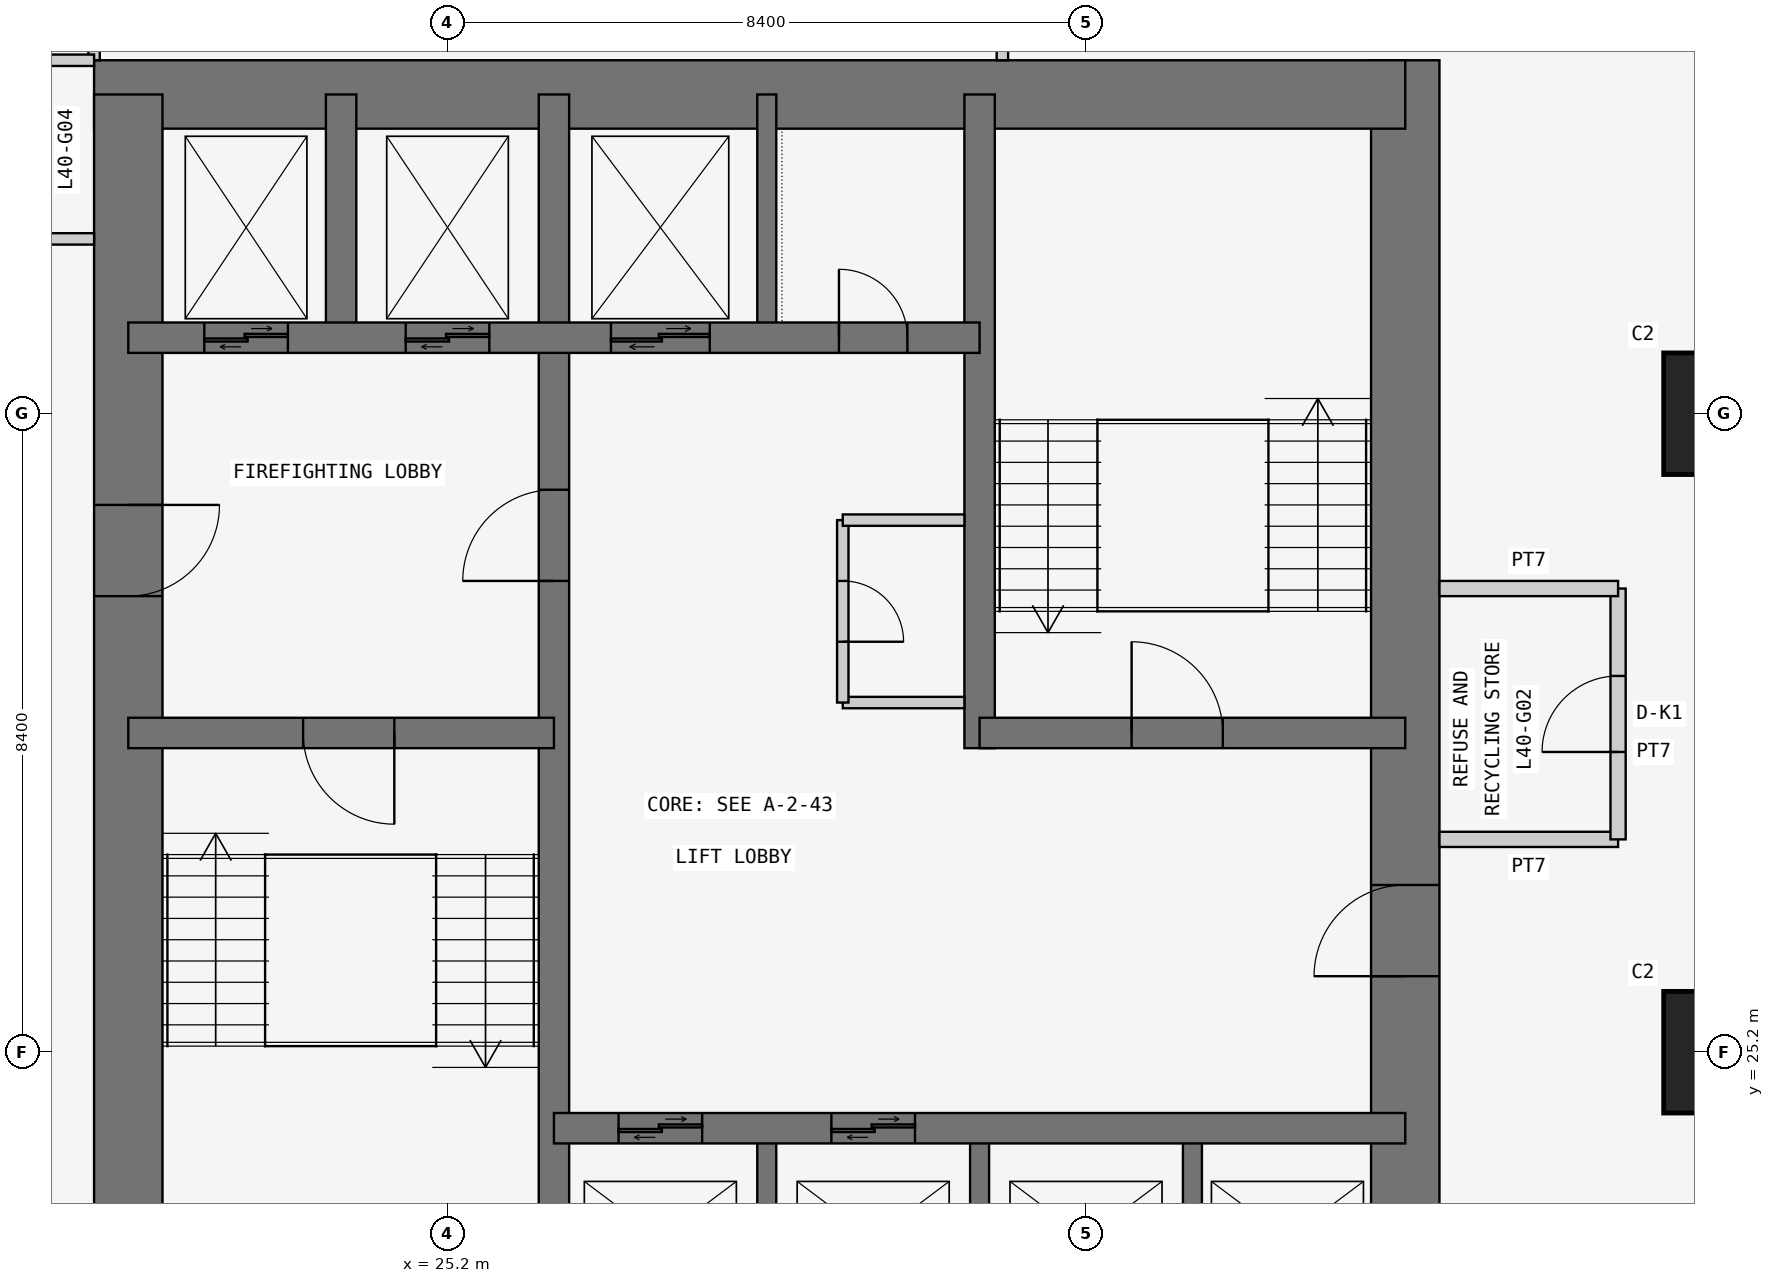
"""IFC4 building model, lengths in metres.
Left out: names, types, materials, properties, quantities, classifications, styles, units other than length and angle.
Written with IfcOpenShell. Run it as: python <this file> out.ifc"""

import sys

from ifc_helpers import new_model, si_unit, direction, frame, frame_2d, origin, origin_2d, place, context, subcontext, project, spatial, rectangle, extrude, element, fill, save


model = new_model("IFC4")
c1 = context("Model", 3, precision=1e-05, world=origin(), true_north=direction((0.0, 1.0)))
c2 = subcontext(c1, "Body", "Model", "MODEL_VIEW")
j1 = project(units=[si_unit("LENGTHUNIT", "METRE"), si_unit("PLANEANGLEUNIT", "RADIAN")], contexts=[c1])
p1 = place(None, origin())
s1 = spatial("IfcSite", under=j1, at=p1, CompositionType="ELEMENT")
p2 = place(p1, origin())
s2 = spatial("IfcBuilding", under=s1, at=p2, CompositionType="ELEMENT")
p3 = place(p2, frame((0.0, 0.0, 155.7)))
s3 = spatial("IfcBuildingStorey", under=s2, at=p3, CompositionType="ELEMENT", Elevation=155.7)
for number, where, z_axis, x_axis in (
    (1, (42.0, 25.2, 0.0), (0.0, 0.0, 1.0), (1.0, 0.0, 0.0)),
    (2, (42.0, 33.6, 0.0), (0.0, 0.0, 1.0), (1.0, 0.0, 0.0)),
):
    element("IfcColumn", number, at=place(p3, frame(where, z_axis=z_axis, x_axis=x_axis)), inside=s3, PredefinedType="COLUMN", context=c2, shape_type="SweptSolid", body=[
        extrude(rectangle(XDim=1.6, YDim=1.6, at=origin_2d()), origin(), (0.0, 0.0, 1.0), 3.6),
    ])
p4 = place(p3, frame((37.8, 21.0, 0.0), z_axis=(0.0, 0.0, 1.0), x_axis=(0.0, 1.0, 0.0)))
e3 = element("IfcWall", 3, at=p4, inside=s3, PredefinedType="SHEAR", context=c2, shape_type="SweptSolid", body=[
    extrude(rectangle(XDim=17.25, YDim=0.9, at=frame_2d((8.625, 0.0))), origin(), (0.0, 0.0, 1.0), 3.6),
])
p5 = place(p4, frame((5.2, 0.0, 0.0)))
e4 = element("IfcOpeningElement", 4, at=p5, cuts=e3, PredefinedType="OPENING", context=c2, shape_type="SweptSolid", body=[
    extrude(rectangle(XDim=1.2, YDim=2.1, at=frame_2d((0.6, 1.05))), frame((0.0, 0.46, 0.0), z_axis=(0.0, -1.0, 0.0), x_axis=(1.0, 0.0, 0.0)), (0.0, 0.0, 1.0), 0.92),
])
p6 = place(p3, frame((37.8, 37.8, 0.0), z_axis=(0.0, 0.0, 1.0), x_axis=(-1.0, 0.0, 0.0)))
e5 = element("IfcWall", 5, at=p6, inside=s3, PredefinedType="SHEAR", context=c2, shape_type="SweptSolid", body=[
    extrude(rectangle(XDim=17.25, YDim=0.9, at=frame_2d((8.625, 0.0))), origin(), (0.0, 0.0, 1.0), 3.6),
])
p7 = place(p3, frame((21.0, 37.8, 0.0), z_axis=(0.0, 0.0, 1.0), x_axis=(0.0, -1.0, 0.0)))
e6 = element("IfcWall", 6, at=p7, inside=s3, PredefinedType="SHEAR", context=c2, shape_type="SweptSolid", body=[
    extrude(rectangle(XDim=17.25, YDim=0.9, at=frame_2d((8.625, 0.0))), origin(), (0.0, 0.0, 1.0), 3.6),
])
p8 = place(p7, frame((5.4, 0.0, 0.0)))
e7 = element("IfcOpeningElement", 7, at=p8, cuts=e6, PredefinedType="OPENING", context=c2, shape_type="SweptSolid", body=[
    extrude(rectangle(XDim=1.2, YDim=2.1, at=frame_2d((0.6, 1.05))), frame((0.0, 0.46, 0.0), z_axis=(0.0, -1.0, 0.0), x_axis=(1.0, 0.0, 0.0)), (0.0, 0.0, 1.0), 0.92),
])
p9 = place(p3, frame((26.6, 21.0, 0.0), z_axis=(0.0, 0.0, 1.0), x_axis=(0.0, 1.0, 0.0)))
e8 = element("IfcWall", 8, at=p9, inside=s3, PredefinedType="SHEAR", context=c2, shape_type="SweptSolid", body=[
    extrude(rectangle(XDim=16.8, YDim=0.4, at=frame_2d((8.4, 0.0))), origin(), (0.0, 0.0, 1.0), 3.6),
])
p10 = place(p9, frame((10.4, 0.0, 0.0)))
e9 = element("IfcOpeningElement", 9, at=p10, cuts=e8, PredefinedType="OPENING", context=c2, shape_type="SweptSolid", body=[
    extrude(rectangle(XDim=1.2, YDim=2.1, at=frame_2d((0.6, 1.05))), frame((0.0, 0.21, 0.0), z_axis=(0.0, -1.0, 0.0), x_axis=(1.0, 0.0, 0.0)), (0.0, 0.0, 1.0), 0.42),
])
p11 = place(p3, frame((21.0, 29.4, 0.0), z_axis=(0.0, 0.0, 1.0), x_axis=(1.0, 0.0, 0.0)))
e10 = element("IfcWall", 10, at=p11, inside=s3, PredefinedType="SHEAR", context=c2, shape_type="SweptSolid", body=[
    extrude(rectangle(XDim=5.6, YDim=0.4, at=frame_2d((2.8, 0.0))), origin(), (0.0, 0.0, 1.0), 3.6),
])
p12 = place(p11, frame((2.3, 0.0, 0.0)))
e11 = element("IfcOpeningElement", 11, at=p12, cuts=e10, PredefinedType="OPENING", context=c2, shape_type="SweptSolid", body=[
    extrude(rectangle(XDim=1.2, YDim=2.1, at=frame_2d((0.6, 1.05))), frame((0.0, 0.21, 0.0), z_axis=(0.0, -1.0, 0.0), x_axis=(1.0, 0.0, 0.0)), (0.0, 0.0, 1.0), 0.42),
])
p13 = place(p3, frame((21.0, 34.6, 0.0), z_axis=(0.0, 0.0, 1.0), x_axis=(1.0, 0.0, 0.0)))
e12 = element("IfcWall", 12, at=p13, inside=s3, PredefinedType="SHEAR", context=c2, shape_type="SweptSolid", body=[
    extrude(rectangle(XDim=11.2, YDim=0.4, at=frame_2d((5.6, 0.0))), origin(), (0.0, 0.0, 1.0), 3.6),
])
p14 = place(p13, frame((9.35, 0.0, 0.0)))
e13 = element("IfcOpeningElement", 13, at=p14, cuts=e12, PredefinedType="OPENING", context=c2, shape_type="SweptSolid", body=[
    extrude(rectangle(XDim=0.9, YDim=2.1, at=frame_2d((0.45, 1.05))), frame((0.0, 0.21, 0.0), z_axis=(0.0, -1.0, 0.0), x_axis=(1.0, 0.0, 0.0)), (0.0, 0.0, 1.0), 0.42),
])
p15 = place(p13, frame((1.0, 0.0, 0.0)))
e14 = element("IfcOpeningElement", 14, at=p15, cuts=e12, PredefinedType="OPENING", context=c2, shape_type="SweptSolid", body=[
    extrude(rectangle(XDim=1.1, YDim=2.1, at=frame_2d((0.55, 1.05))), frame((0.0, 0.21, 0.0), z_axis=(0.0, -1.0, 0.0), x_axis=(1.0, 0.0, 0.0)), (0.0, 0.0, 1.0), 0.42),
])
p16 = place(p13, frame((3.65, 0.0, 0.0)))
e15 = element("IfcOpeningElement", 15, at=p16, cuts=e12, PredefinedType="OPENING", context=c2, shape_type="SweptSolid", body=[
    extrude(rectangle(XDim=1.1, YDim=2.1, at=frame_2d((0.55, 1.05))), frame((0.0, 0.21, 0.0), z_axis=(0.0, -1.0, 0.0), x_axis=(1.0, 0.0, 0.0)), (0.0, 0.0, 1.0), 0.42),
])
p17 = place(p13, frame((6.35, 0.0, 0.0)))
e16 = element("IfcOpeningElement", 16, at=p17, cuts=e12, PredefinedType="OPENING", context=c2, shape_type="SweptSolid", body=[
    extrude(rectangle(XDim=1.3, YDim=2.1, at=frame_2d((0.65, 1.05))), frame((0.0, 0.21, 0.0), z_axis=(0.0, -1.0, 0.0), x_axis=(1.0, 0.0, 0.0)), (0.0, 0.0, 1.0), 0.42),
])
p18 = place(p3, frame((23.8, 34.6, 0.0), z_axis=(0.0, 0.0, 1.0), x_axis=(0.0, 1.0, 0.0)))
e17 = element("IfcWall", 17, at=p18, inside=s3, PredefinedType="SHEAR", context=c2, shape_type="SweptSolid", body=[
    extrude(rectangle(XDim=3.2, YDim=0.4, at=frame_2d((1.6, 0.0))), origin(), (0.0, 0.0, 1.0), 3.6),
])
p19 = place(p3, frame((26.6, 24.2, 0.0), z_axis=(0.0, 0.0, 1.0), x_axis=(1.0, 0.0, 0.0)))
e18 = element("IfcWall", 18, at=p19, inside=s3, PredefinedType="SHEAR", context=c2, shape_type="SweptSolid", body=[
    extrude(rectangle(XDim=11.2, YDim=0.4, at=frame_2d((5.6, 0.0))), origin(), (0.0, 0.0, 1.0), 3.6),
])
p20 = place(p19, frame((0.85, 0.0, 0.0)))
e19 = element("IfcOpeningElement", 19, at=p20, cuts=e18, PredefinedType="OPENING", context=c2, shape_type="SweptSolid", body=[
    extrude(rectangle(XDim=1.1, YDim=2.1, at=frame_2d((0.55, 1.05))), frame((0.0, 0.21, 0.0), z_axis=(0.0, -1.0, 0.0), x_axis=(1.0, 0.0, 0.0)), (0.0, 0.0, 1.0), 0.42),
])
p21 = place(p19, frame((3.65, 0.0, 0.0)))
e20 = element("IfcOpeningElement", 20, at=p21, cuts=e18, PredefinedType="OPENING", context=c2, shape_type="SweptSolid", body=[
    extrude(rectangle(XDim=1.1, YDim=2.1, at=frame_2d((0.55, 1.05))), frame((0.0, 0.21, 0.0), z_axis=(0.0, -1.0, 0.0), x_axis=(1.0, 0.0, 0.0)), (0.0, 0.0, 1.0), 0.42),
])
p22 = place(p3, frame((32.2, 29.2, 0.0), z_axis=(0.0, 0.0, 1.0), x_axis=(0.0, 1.0, 0.0)))
e21 = element("IfcWall", 21, at=p22, inside=s3, PredefinedType="SHEAR", context=c2, shape_type="SweptSolid", body=[
    extrude(rectangle(XDim=8.6, YDim=0.4, at=frame_2d((4.3, 0.0))), origin(), (0.0, 0.0, 1.0), 3.6),
])
p23 = place(p3, frame((32.2, 29.4, 0.0), z_axis=(0.0, 0.0, 1.0), x_axis=(1.0, 0.0, 0.0)))
e22 = element("IfcWall", 22, at=p23, inside=s3, PredefinedType="SHEAR", context=c2, shape_type="SweptSolid", body=[
    extrude(rectangle(XDim=5.6, YDim=0.4, at=frame_2d((2.8, 0.0))), origin(), (0.0, 0.0, 1.0), 3.6),
])
p24 = place(p23, frame((2.0, 0.0, 0.0)))
e23 = element("IfcOpeningElement", 23, at=p24, cuts=e22, PredefinedType="OPENING", context=c2, shape_type="SweptSolid", body=[
    extrude(rectangle(XDim=1.2, YDim=2.1, at=frame_2d((0.6, 1.05))), frame((0.0, 0.21, 0.0), z_axis=(0.0, -1.0, 0.0), x_axis=(1.0, 0.0, 0.0)), (0.0, 0.0, 1.0), 0.42),
])
for number, where, z_axis, x_axis in (
    (24, (29.4, 21.0, 0.0), (0.0, 0.0, 1.0), (0.0, 1.0, 0.0)),
    (25, (32.2, 21.0, 0.0), (0.0, 0.0, 1.0), (0.0, 1.0, 0.0)),
    (26, (35.0, 21.0, 0.0), (0.0, 0.0, 1.0), (0.0, 1.0, 0.0)),
    (27, (29.4, 34.6, 0.0), (0.0, 0.0, 1.0), (0.0, 1.0, 0.0)),
):
    element("IfcWall", number, at=place(p3, frame(where, z_axis=z_axis, x_axis=x_axis)), inside=s3, PredefinedType="SHEAR", context=c2, shape_type="SweptSolid", body=[
        extrude(rectangle(XDim=3.2, YDim=0.25, at=frame_2d((1.6, 0.0))), origin(), (0.0, 0.0, 1.0), 3.6),
    ])
for number, where, z_axis, x_axis in (
    (28, (32.5, 38.25, 0.0), (0.0, 0.0, 1.0), (0.0, 1.0, 0.0)),
    (29, (20.55, 39.65, 0.0), (0.0, 0.0, 1.0), (0.0, -1.0, 0.0)),
):
    element("IfcWall", number, at=place(p3, frame(where, z_axis=z_axis, x_axis=x_axis)), inside=s3, PredefinedType="PARTITIONING", context=c2, shape_type="SweptSolid", body=[
        extrude(rectangle(XDim=1.4, YDim=0.15, at=frame_2d((0.7, 0.0))), origin(), (0.0, 0.0, 1.0), 3.45),
    ])
p25 = place(p3, frame((38.25, 28.0, 0.0), z_axis=(0.0, 0.0, 1.0), x_axis=(1.0, 0.0, 0.0)))
e30 = element("IfcWall", 30, at=p25, inside=s3, PredefinedType="PARTITIONING", context=c2, shape_type="SweptSolid", body=[
    extrude(rectangle(XDim=2.35, YDim=0.2, at=frame_2d((1.175, 0.0))), origin(), (0.0, 0.0, 1.0), 3.45),
])
p26 = place(p3, frame((40.6, 28.0, 0.0), z_axis=(0.0, 0.0, 1.0), x_axis=(0.0, 1.0, 0.0)))
e31 = element("IfcWall", 31, at=p26, inside=s3, PredefinedType="PARTITIONING", context=c2, shape_type="SweptSolid", body=[
    extrude(rectangle(XDim=3.3, YDim=0.2, at=frame_2d((1.65, 0.0))), origin(), (0.0, 0.0, 1.0), 3.45),
])
p27 = place(p26, frame((1.15, 0.0, 0.0)))
e32 = element("IfcOpeningElement", 32, at=p27, cuts=e31, PredefinedType="OPENING", context=c2, shape_type="SweptSolid", body=[
    extrude(rectangle(XDim=1.0, YDim=2.1, at=frame_2d((0.5, 1.05))), frame((0.0, 0.11, 0.0), z_axis=(0.0, -1.0, 0.0), x_axis=(1.0, 0.0, 0.0)), (0.0, 0.0, 1.0), 0.22),
])
p28 = place(p3, frame((40.6, 31.3, 0.0), z_axis=(0.0, 0.0, 1.0), x_axis=(-1.0, 0.0, 0.0)))
e33 = element("IfcWall", 33, at=p28, inside=s3, PredefinedType="PARTITIONING", context=c2, shape_type="SweptSolid", body=[
    extrude(rectangle(XDim=2.35, YDim=0.2, at=frame_2d((1.175, 0.0))), origin(), (0.0, 0.0, 1.0), 3.45),
])
for number, where, z_axis, x_axis in (
    (34, (20.55, 38.25, 0.0), (0.0, 0.0, 1.0), (-1.0, 0.0, 0.0)),
    (35, (18.2, 35.9, 0.0), (0.0, 0.0, 1.0), (1.0, 0.0, 0.0)),
):
    element("IfcWall", number, at=place(p3, frame(where, z_axis=z_axis, x_axis=x_axis)), inside=s3, PredefinedType="PARTITIONING", context=c2, shape_type="SweptSolid", body=[
        extrude(rectangle(XDim=2.35, YDim=0.15, at=frame_2d((1.175, 0.0))), origin(), (0.0, 0.0, 1.0), 3.45),
    ])
p29 = place(p3, frame((32.0, 29.8, 0.0), z_axis=(0.0, 0.0, 1.0), x_axis=(-1.0, 0.0, 0.0)))
e36 = element("IfcWall", 36, at=p29, inside=s3, PredefinedType="PARTITIONING", context=c2, shape_type="SweptSolid", body=[
    extrude(rectangle(XDim=1.6, YDim=0.15, at=frame_2d((0.8, 0.0))), origin(), (0.0, 0.0, 1.0), 3.45),
])
p30 = place(p3, frame((30.4, 29.8, 0.0), z_axis=(0.0, 0.0, 1.0), x_axis=(0.0, 1.0, 0.0)))
e37 = element("IfcWall", 37, at=p30, inside=s3, PredefinedType="PARTITIONING", context=c2, shape_type="SweptSolid", body=[
    extrude(rectangle(XDim=2.4, YDim=0.15, at=frame_2d((1.2, 0.0))), origin(), (0.0, 0.0, 1.0), 3.45),
])
p31 = place(p30, frame((0.8, 0.0, 0.0)))
e38 = element("IfcOpeningElement", 38, at=p31, cuts=e37, PredefinedType="OPENING", context=c2, shape_type="SweptSolid", body=[
    extrude(rectangle(XDim=0.8, YDim=2.1, at=frame_2d((0.4, 1.05))), frame((0.0, 0.085, 0.0), z_axis=(0.0, -1.0, 0.0), x_axis=(1.0, 0.0, 0.0)), (0.0, 0.0, 1.0), 0.17),
])
p32 = place(p3, frame((30.4, 32.2, 0.0), z_axis=(0.0, 0.0, 1.0), x_axis=(1.0, 0.0, 0.0)))
e39 = element("IfcWall", 39, at=p32, inside=s3, PredefinedType="PARTITIONING", context=c2, shape_type="SweptSolid", body=[
    extrude(rectangle(XDim=1.6, YDim=0.15, at=frame_2d((0.8, 0.0))), origin(), (0.0, 0.0, 1.0), 3.45),
])
p33 = place(p27, origin())
e40 = element("IfcDoor", 40, at=p33, inside=s3, OperationType="SINGLE_SWING_LEFT", PredefinedType="DOOR", context=c2, shape_type="SweptSolid", body=[
    extrude(rectangle(XDim=1.0, YDim=2.1, at=frame_2d((0.5, 1.05))), frame((0.0, 0.025, 0.0), z_axis=(0.0, -1.0, 0.0), x_axis=(1.0, 0.0, 0.0)), (0.0, 0.0, 1.0), 0.05),
])
fill(e32, e40)
p34 = place(p8, origin())
e41 = element("IfcDoor", 41, at=p34, inside=s3, OperationType="SINGLE_SWING_LEFT", PredefinedType="DOOR", context=c2, shape_type="SweptSolid", body=[
    extrude(rectangle(XDim=1.2, YDim=2.1, at=frame_2d((0.6, 1.05))), frame((0.0, 0.025, 0.0), z_axis=(0.0, -1.0, 0.0), x_axis=(1.0, 0.0, 0.0)), (0.0, 0.0, 1.0), 0.05),
])
fill(e7, e41)
p35 = place(p12, frame((1.2, 0.0, 0.0), z_axis=(0.0, 0.0, 1.0), x_axis=(-1.0, 0.0, 0.0)))
e42 = element("IfcDoor", 42, at=p35, inside=s3, OperationType="SINGLE_SWING_LEFT", PredefinedType="DOOR", context=c2, shape_type="SweptSolid", body=[
    extrude(rectangle(XDim=1.2, YDim=2.1, at=frame_2d((0.6, 1.05))), frame((0.0, 0.025, 0.0), z_axis=(0.0, -1.0, 0.0), x_axis=(1.0, 0.0, 0.0)), (0.0, 0.0, 1.0), 0.05),
])
fill(e11, e42)
p36 = place(p10, origin())
e43 = element("IfcDoor", 43, at=p36, inside=s3, OperationType="SINGLE_SWING_LEFT", PredefinedType="DOOR", context=c2, shape_type="SweptSolid", body=[
    extrude(rectangle(XDim=1.2, YDim=2.1, at=frame_2d((0.6, 1.05))), frame((0.0, 0.025, 0.0), z_axis=(0.0, -1.0, 0.0), x_axis=(1.0, 0.0, 0.0)), (0.0, 0.0, 1.0), 0.05),
])
fill(e9, e43)
p37 = place(p5, origin())
e44 = element("IfcDoor", 44, at=p37, inside=s3, OperationType="SINGLE_SWING_LEFT", PredefinedType="DOOR", context=c2, shape_type="SweptSolid", body=[
    extrude(rectangle(XDim=1.2, YDim=2.1, at=frame_2d((0.6, 1.05))), frame((0.0, 0.025, 0.0), z_axis=(0.0, -1.0, 0.0), x_axis=(1.0, 0.0, 0.0)), (0.0, 0.0, 1.0), 0.05),
])
fill(e4, e44)
p38 = place(p24, origin())
e45 = element("IfcDoor", 45, at=p38, inside=s3, OperationType="SINGLE_SWING_LEFT", PredefinedType="DOOR", context=c2, shape_type="SweptSolid", body=[
    extrude(rectangle(XDim=1.2, YDim=2.1, at=frame_2d((0.6, 1.05))), frame((0.0, 0.025, 0.0), z_axis=(0.0, -1.0, 0.0), x_axis=(1.0, 0.0, 0.0)), (0.0, 0.0, 1.0), 0.05),
])
fill(e23, e45)
p39 = place(p14, origin())
e46 = element("IfcDoor", 46, at=p39, inside=s3, OperationType="SINGLE_SWING_LEFT", PredefinedType="DOOR", context=c2, shape_type="SweptSolid", body=[
    extrude(rectangle(XDim=0.9, YDim=2.1, at=frame_2d((0.45, 1.05))), frame((0.0, 0.025, 0.0), z_axis=(0.0, -1.0, 0.0), x_axis=(1.0, 0.0, 0.0)), (0.0, 0.0, 1.0), 0.05),
])
fill(e13, e46)
p40 = place(p31, frame((0.8, 0.0, 0.0), z_axis=(0.0, 0.0, 1.0), x_axis=(-1.0, 0.0, 0.0)))
e47 = element("IfcDoor", 47, at=p40, inside=s3, OperationType="SINGLE_SWING_RIGHT", PredefinedType="DOOR", context=c2, shape_type="SweptSolid", body=[
    extrude(rectangle(XDim=0.8, YDim=2.1, at=frame_2d((0.4, 1.05))), frame((0.0, 0.025, 0.0), z_axis=(0.0, -1.0, 0.0), x_axis=(1.0, 0.0, 0.0)), (0.0, 0.0, 1.0), 0.05),
])
fill(e38, e47)
p41 = place(p20, origin())
e48 = element("IfcDoor", 48, at=p41, inside=s3, OperationType="DOUBLE_DOOR_SLIDING", PredefinedType="DOOR", context=c2, shape_type="SweptSolid", body=[
    extrude(rectangle(XDim=1.1, YDim=2.1, at=frame_2d((0.55, 1.05))), frame((0.0, 0.025, 0.0), z_axis=(0.0, -1.0, 0.0), x_axis=(1.0, 0.0, 0.0)), (0.0, 0.0, 1.0), 0.05),
])
fill(e19, e48)
p42 = place(p21, origin())
e49 = element("IfcDoor", 49, at=p42, inside=s3, OperationType="DOUBLE_DOOR_SLIDING", PredefinedType="DOOR", context=c2, shape_type="SweptSolid", body=[
    extrude(rectangle(XDim=1.1, YDim=2.1, at=frame_2d((0.55, 1.05))), frame((0.0, 0.025, 0.0), z_axis=(0.0, -1.0, 0.0), x_axis=(1.0, 0.0, 0.0)), (0.0, 0.0, 1.0), 0.05),
])
fill(e20, e49)
p43 = place(p15, origin())
e50 = element("IfcDoor", 50, at=p43, inside=s3, OperationType="DOUBLE_DOOR_SLIDING", PredefinedType="DOOR", context=c2, shape_type="SweptSolid", body=[
    extrude(rectangle(XDim=1.1, YDim=2.1, at=frame_2d((0.55, 1.05))), frame((0.0, 0.025, 0.0), z_axis=(0.0, -1.0, 0.0), x_axis=(1.0, 0.0, 0.0)), (0.0, 0.0, 1.0), 0.05),
])
fill(e14, e50)
p44 = place(p16, origin())
e51 = element("IfcDoor", 51, at=p44, inside=s3, OperationType="DOUBLE_DOOR_SLIDING", PredefinedType="DOOR", context=c2, shape_type="SweptSolid", body=[
    extrude(rectangle(XDim=1.1, YDim=2.1, at=frame_2d((0.55, 1.05))), frame((0.0, 0.025, 0.0), z_axis=(0.0, -1.0, 0.0), x_axis=(1.0, 0.0, 0.0)), (0.0, 0.0, 1.0), 0.05),
])
fill(e15, e51)
p45 = place(p17, origin())
e52 = element("IfcDoor", 52, at=p45, inside=s3, OperationType="DOUBLE_DOOR_SLIDING", PredefinedType="DOOR", context=c2, shape_type="SweptSolid", body=[
    extrude(rectangle(XDim=1.3, YDim=2.1, at=frame_2d((0.65, 1.05))), frame((0.0, 0.025, 0.0), z_axis=(0.0, -1.0, 0.0), x_axis=(1.0, 0.0, 0.0)), (0.0, 0.0, 1.0), 0.05),
])
fill(e16, e52)
save(model, sys.argv[1])
